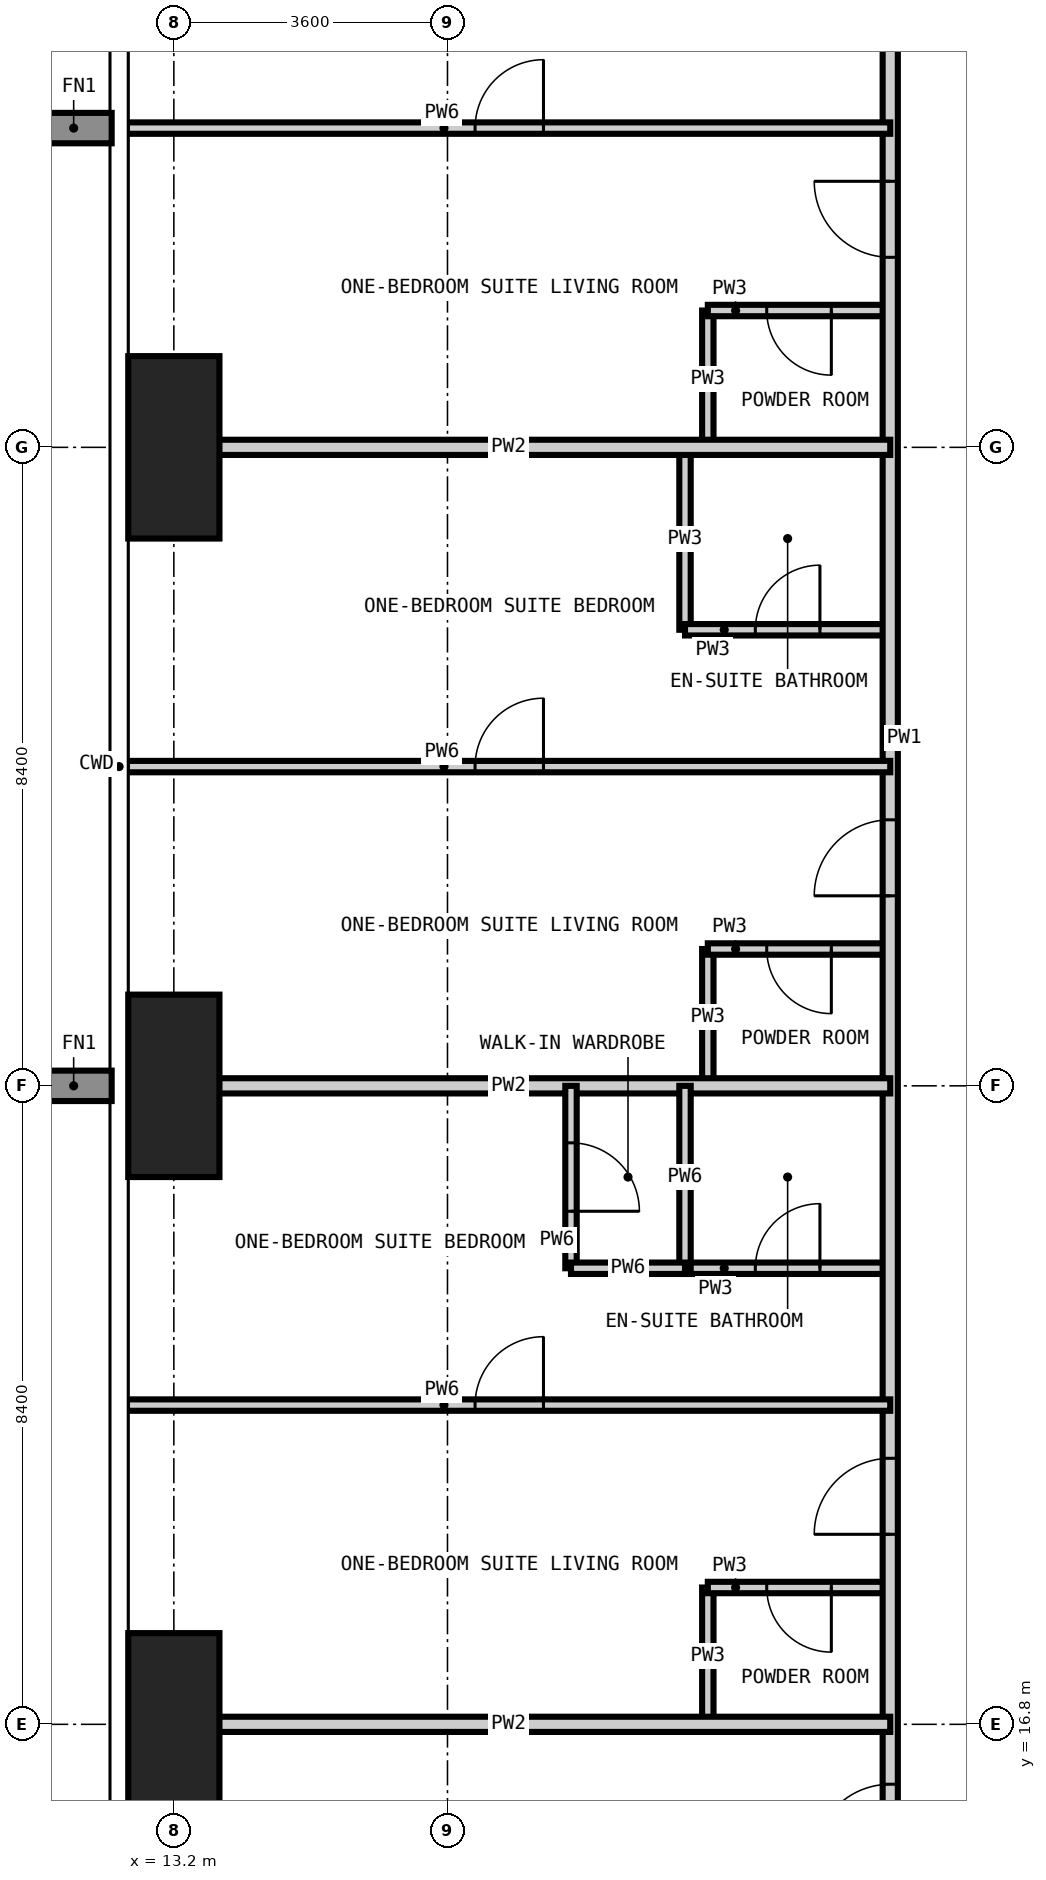
"""IFC4 building model, lengths in metres.
Left out: names, types, materials, properties, quantities, classifications, styles, units other than length and angle.
Written with IfcOpenShell. Run it as: python <this file> out.ifc"""

import sys

from ifc_helpers import new_model, si_unit, direction, frame, frame_2d, origin, origin_2d, place, context, subcontext, project, spatial, rectangle, extrude, element, fill, save


model = new_model("IFC4")
c1 = context("Model", 3, precision=1e-05, world=origin(), true_north=direction((0.0, 1.0)))
c2 = subcontext(c1, "Body", "Model", "MODEL_VIEW")
j1 = project(units=[si_unit("LENGTHUNIT", "METRE"), si_unit("PLANEANGLEUNIT", "RADIAN")], contexts=[c1])
p1 = place(None, origin())
s1 = spatial("IfcSite", under=j1, at=p1, CompositionType="ELEMENT")
p2 = place(p1, origin())
s2 = spatial("IfcBuilding", under=s1, at=p2, CompositionType="ELEMENT")
p3 = place(p2, frame((0.0, 0.0, 233.4)))
s3 = spatial("IfcBuildingStorey", under=s2, at=p3, CompositionType="ELEMENT", Elevation=233.4)
for number, where, z_axis, x_axis in (
    (1, (13.2, 16.8, -0.35), (0.0, 0.0, 1.0), (1.0, 0.0, 0.0)),
    (2, (13.2, 25.2, -0.35), (0.0, 0.0, 1.0), (1.0, 0.0, 0.0)),
    (3, (13.2, 33.6, -0.35), (0.0, 0.0, 1.0), (1.0, 0.0, 0.0)),
):
    element("IfcColumn", number, at=place(p3, frame(where, z_axis=z_axis, x_axis=x_axis)), inside=s3, PredefinedType="COLUMN", context=c2, shape_type="SweptSolid", body=[
        extrude(rectangle(XDim=1.2, YDim=2.4, at=origin_2d()), origin(), (0.0, 0.0, 1.0), 3.9),
    ])
p4 = place(p3, frame((19.925, 31.2, 0.0), z_axis=(0.0, 0.0, 1.0), x_axis=(0.0, 1.0, 0.0)))
e4 = element("IfcWall", 4, at=p4, inside=s3, PredefinedType="PARTITIONING", context=c2, shape_type="SweptSolid", body=[
    extrude(rectangle(XDim=2.4, YDim=0.15, at=frame_2d((1.2, 0.0))), origin(), (0.0, 0.0, 1.0), 3.55),
])
for number, where, z_axis, x_axis in (
    (5, (20.225, 16.8, 0.0), (0.0, 0.0, 1.0), (0.0, 1.0, 0.0)),
    (6, (20.225, 25.2, 0.0), (0.0, 0.0, 1.0), (0.0, 1.0, 0.0)),
):
    element("IfcWall", number, at=place(p3, frame(where, z_axis=z_axis, x_axis=x_axis)), inside=s3, PredefinedType="PARTITIONING", context=c2, shape_type="SweptSolid", body=[
        extrude(rectangle(XDim=1.8, YDim=0.15, at=frame_2d((0.9, 0.0))), origin(), (0.0, 0.0, 1.0), 3.55),
    ])
p5 = place(p3, frame((20.225, 33.6, 0.0), z_axis=(0.0, 0.0, 1.0), x_axis=(0.0, 1.0, 0.0)))
e7 = element("IfcWall", 7, at=p5, inside=s3, PredefinedType="PARTITIONING", context=c2, shape_type="SweptSolid", body=[
    extrude(rectangle(XDim=1.8, YDim=0.15, at=frame_2d((0.9, 0.0))), origin(), (0.0, 0.0, 1.0), 3.55),
])
p6 = place(p3, frame((20.225, 18.6, 0.0), z_axis=(0.0, 0.0, 1.0), x_axis=(1.0, 0.0, 0.0)))
e8 = element("IfcWall", 8, at=p6, inside=s3, PredefinedType="PARTITIONING", context=c2, shape_type="SweptSolid", body=[
    extrude(rectangle(XDim=2.4, YDim=0.15, at=frame_2d((1.2, 0.0))), origin(), (0.0, 0.0, 1.0), 3.55),
])
p7 = place(p6, frame((0.775, 0.0, 0.0)))
e9 = element("IfcOpeningElement", 9, at=p7, cuts=e8, PredefinedType="OPENING", context=c2, shape_type="SweptSolid", body=[
    extrude(rectangle(XDim=0.85, YDim=2.1, at=frame_2d((0.425, 1.05))), frame((0.0, 0.085, 0.0), z_axis=(0.0, -1.0, 0.0), x_axis=(1.0, 0.0, 0.0)), (0.0, 0.0, 1.0), 0.17),
])
p8 = place(p3, frame((19.925, 22.8, 0.0), z_axis=(0.0, 0.0, 1.0), x_axis=(1.0, 0.0, 0.0)))
e10 = element("IfcWall", 10, at=p8, inside=s3, PredefinedType="PARTITIONING", context=c2, shape_type="SweptSolid", body=[
    extrude(rectangle(XDim=2.7, YDim=0.15, at=frame_2d((1.35, 0.0))), origin(), (0.0, 0.0, 1.0), 3.55),
])
p9 = place(p8, frame((0.925, 0.0, 0.0)))
e11 = element("IfcOpeningElement", 11, at=p9, cuts=e10, PredefinedType="OPENING", context=c2, shape_type="SweptSolid", body=[
    extrude(rectangle(XDim=0.85, YDim=2.1, at=frame_2d((0.425, 1.05))), frame((0.0, 0.085, 0.0), z_axis=(0.0, -1.0, 0.0), x_axis=(1.0, 0.0, 0.0)), (0.0, 0.0, 1.0), 0.17),
])
p10 = place(p3, frame((20.225, 27.0, 0.0), z_axis=(0.0, 0.0, 1.0), x_axis=(1.0, 0.0, 0.0)))
e12 = element("IfcWall", 12, at=p10, inside=s3, PredefinedType="PARTITIONING", context=c2, shape_type="SweptSolid", body=[
    extrude(rectangle(XDim=2.4, YDim=0.15, at=frame_2d((1.2, 0.0))), origin(), (0.0, 0.0, 1.0), 3.55),
])
p11 = place(p10, frame((0.775, 0.0, 0.0)))
e13 = element("IfcOpeningElement", 13, at=p11, cuts=e12, PredefinedType="OPENING", context=c2, shape_type="SweptSolid", body=[
    extrude(rectangle(XDim=0.85, YDim=2.1, at=frame_2d((0.425, 1.05))), frame((0.0, 0.085, 0.0), z_axis=(0.0, -1.0, 0.0), x_axis=(1.0, 0.0, 0.0)), (0.0, 0.0, 1.0), 0.17),
])
p12 = place(p3, frame((19.925, 31.2, 0.0), z_axis=(0.0, 0.0, 1.0), x_axis=(1.0, 0.0, 0.0)))
e14 = element("IfcWall", 14, at=p12, inside=s3, PredefinedType="PARTITIONING", context=c2, shape_type="SweptSolid", body=[
    extrude(rectangle(XDim=2.7, YDim=0.15, at=frame_2d((1.35, 0.0))), origin(), (0.0, 0.0, 1.0), 3.55),
])
p13 = place(p12, frame((0.925, 0.0, 0.0)))
e15 = element("IfcOpeningElement", 15, at=p13, cuts=e14, PredefinedType="OPENING", context=c2, shape_type="SweptSolid", body=[
    extrude(rectangle(XDim=0.85, YDim=2.1, at=frame_2d((0.425, 1.05))), frame((0.0, 0.085, 0.0), z_axis=(0.0, -1.0, 0.0), x_axis=(1.0, 0.0, 0.0)), (0.0, 0.0, 1.0), 0.17),
])
p14 = place(p3, frame((20.225, 35.4, 0.0), z_axis=(0.0, 0.0, 1.0), x_axis=(1.0, 0.0, 0.0)))
e16 = element("IfcWall", 16, at=p14, inside=s3, PredefinedType="PARTITIONING", context=c2, shape_type="SweptSolid", body=[
    extrude(rectangle(XDim=2.4, YDim=0.15, at=frame_2d((1.2, 0.0))), origin(), (0.0, 0.0, 1.0), 3.55),
])
p15 = place(p14, frame((0.775, 0.0, 0.0)))
e17 = element("IfcOpeningElement", 17, at=p15, cuts=e16, PredefinedType="OPENING", context=c2, shape_type="SweptSolid", body=[
    extrude(rectangle(XDim=0.85, YDim=2.1, at=frame_2d((0.425, 1.05))), frame((0.0, 0.085, 0.0), z_axis=(0.0, -1.0, 0.0), x_axis=(1.0, 0.0, 0.0)), (0.0, 0.0, 1.0), 0.17),
])
p16 = place(p3, frame((22.625, 14.225, 0.0), z_axis=(0.0, 0.0, 1.0), x_axis=(0.0, 1.0, 0.0)))
e18 = element("IfcWall", 18, at=p16, inside=s3, PredefinedType="PARTITIONING", context=c2, shape_type="SweptSolid", body=[
    extrude(rectangle(XDim=30.95, YDim=0.2, at=frame_2d((15.475, 0.0))), origin(), (0.0, 0.0, 1.0), 3.55),
])
p17 = place(p16, frame((5.075, 0.0, 0.0)))
e19 = element("IfcOpeningElement", 19, at=p17, cuts=e18, PredefinedType="OPENING", context=c2, shape_type="SweptSolid", body=[
    extrude(rectangle(XDim=1.0, YDim=2.2, at=frame_2d((0.5, 1.1))), frame((0.0, 0.11, 0.0), z_axis=(0.0, -1.0, 0.0), x_axis=(1.0, 0.0, 0.0)), (0.0, 0.0, 1.0), 0.22),
])
p18 = place(p16, frame((13.475, 0.0, 0.0)))
e20 = element("IfcOpeningElement", 20, at=p18, cuts=e18, PredefinedType="OPENING", context=c2, shape_type="SweptSolid", body=[
    extrude(rectangle(XDim=1.0, YDim=2.2, at=frame_2d((0.5, 1.1))), frame((0.0, 0.11, 0.0), z_axis=(0.0, -1.0, 0.0), x_axis=(1.0, 0.0, 0.0)), (0.0, 0.0, 1.0), 0.22),
])
p19 = place(p16, frame((21.875, 0.0, 0.0)))
e21 = element("IfcOpeningElement", 21, at=p19, cuts=e18, PredefinedType="OPENING", context=c2, shape_type="SweptSolid", body=[
    extrude(rectangle(XDim=1.0, YDim=2.2, at=frame_2d((0.5, 1.1))), frame((0.0, 0.11, 0.0), z_axis=(0.0, -1.0, 0.0), x_axis=(1.0, 0.0, 0.0)), (0.0, 0.0, 1.0), 0.22),
])
p20 = place(p16, frame((0.787, 0.0, 0.0)))
e22 = element("IfcOpeningElement", 22, at=p20, cuts=e18, PredefinedType="OPENING", context=c2, shape_type="SweptSolid", body=[
    extrude(rectangle(XDim=1.0, YDim=2.2, at=frame_2d((0.5, 1.1))), frame((0.0, 0.11, 0.0), z_axis=(0.0, -1.0, 0.0), x_axis=(1.0, 0.0, 0.0)), (0.0, 0.0, 1.0), 0.22),
])
p21 = place(p16, frame((28.862, 0.0, 0.0)))
e23 = element("IfcOpeningElement", 23, at=p21, cuts=e18, PredefinedType="OPENING", context=c2, shape_type="SweptSolid", body=[
    extrude(rectangle(XDim=1.0, YDim=2.2, at=frame_2d((0.5, 1.1))), frame((0.0, 0.11, 0.0), z_axis=(0.0, -1.0, 0.0), x_axis=(1.0, 0.0, 0.0)), (0.0, 0.0, 1.0), 0.22),
])
for number, where, z_axis, x_axis in (
    (24, (12.582, 16.8, 0.0), (0.0, 0.0, 1.0), (1.0, 0.0, 0.0)),
    (25, (12.582, 25.2, 0.0), (0.0, 0.0, 1.0), (1.0, 0.0, 0.0)),
    (26, (12.582, 33.6, 0.0), (0.0, 0.0, 1.0), (1.0, 0.0, 0.0)),
):
    element("IfcWall", number, at=place(p3, frame(where, z_axis=z_axis, x_axis=x_axis)), inside=s3, PredefinedType="PARTITIONING", context=c2, shape_type="SweptSolid", body=[
        extrude(rectangle(XDim=10.043, YDim=0.2, at=frame_2d((5.021, 0.0))), origin(), (0.0, 0.0, 1.0), 3.55),
    ])
p22 = place(p3, frame((18.425, 22.8, 0.0), z_axis=(0.0, 0.0, 1.0), x_axis=(0.0, 1.0, 0.0)))
e27 = element("IfcWall", 27, at=p22, inside=s3, PredefinedType="PARTITIONING", context=c2, shape_type="SweptSolid", body=[
    extrude(rectangle(XDim=2.4, YDim=0.15, at=frame_2d((1.2, 0.0))), origin(), (0.0, 0.0, 1.0), 3.55),
])
p23 = place(p22, frame((0.75, 0.0, 0.0)))
e28 = element("IfcOpeningElement", 28, at=p23, cuts=e27, PredefinedType="OPENING", context=c2, shape_type="SweptSolid", body=[
    extrude(rectangle(XDim=0.9, YDim=2.1, at=frame_2d((0.45, 1.05))), frame((0.0, 0.085, 0.0), z_axis=(0.0, -1.0, 0.0), x_axis=(1.0, 0.0, 0.0)), (0.0, 0.0, 1.0), 0.17),
])
p24 = place(p3, frame((19.925, 22.8, 0.0), z_axis=(0.0, 0.0, 1.0), x_axis=(0.0, 1.0, 0.0)))
e29 = element("IfcWall", 29, at=p24, inside=s3, PredefinedType="PARTITIONING", context=c2, shape_type="SweptSolid", body=[
    extrude(rectangle(XDim=2.4, YDim=0.15, at=frame_2d((1.2, 0.0))), origin(), (0.0, 0.0, 1.0), 3.55),
])
p25 = place(p3, frame((12.582, 21.0, 0.0), z_axis=(0.0, 0.0, 1.0), x_axis=(1.0, 0.0, 0.0)))
e30 = element("IfcWall", 30, at=p25, inside=s3, PredefinedType="PARTITIONING", context=c2, shape_type="SweptSolid", body=[
    extrude(rectangle(XDim=10.043, YDim=0.15, at=frame_2d((5.021, 0.0))), origin(), (0.0, 0.0, 1.0), 3.55),
])
p26 = place(p25, frame((4.581, 0.0, 0.0)))
e31 = element("IfcOpeningElement", 31, at=p26, cuts=e30, PredefinedType="OPENING", context=c2, shape_type="SweptSolid", body=[
    extrude(rectangle(XDim=0.9, YDim=2.1, at=frame_2d((0.45, 1.05))), frame((0.0, 0.085, 0.0), z_axis=(0.0, -1.0, 0.0), x_axis=(1.0, 0.0, 0.0)), (0.0, 0.0, 1.0), 0.17),
])
p27 = place(p3, frame((18.425, 22.8, 0.0), z_axis=(0.0, 0.0, 1.0), x_axis=(1.0, 0.0, 0.0)))
e32 = element("IfcWall", 32, at=p27, inside=s3, PredefinedType="PARTITIONING", context=c2, shape_type="SweptSolid", body=[
    extrude(rectangle(XDim=1.5, YDim=0.15, at=frame_2d((0.75, 0.0))), origin(), (0.0, 0.0, 1.0), 3.55),
])
p28 = place(p3, frame((12.582, 29.4, 0.0), z_axis=(0.0, 0.0, 1.0), x_axis=(1.0, 0.0, 0.0)))
e33 = element("IfcWall", 33, at=p28, inside=s3, PredefinedType="PARTITIONING", context=c2, shape_type="SweptSolid", body=[
    extrude(rectangle(XDim=10.043, YDim=0.15, at=frame_2d((5.021, 0.0))), origin(), (0.0, 0.0, 1.0), 3.55),
])
p29 = place(p28, frame((4.581, 0.0, 0.0)))
e34 = element("IfcOpeningElement", 34, at=p29, cuts=e33, PredefinedType="OPENING", context=c2, shape_type="SweptSolid", body=[
    extrude(rectangle(XDim=0.9, YDim=2.1, at=frame_2d((0.45, 1.05))), frame((0.0, 0.085, 0.0), z_axis=(0.0, -1.0, 0.0), x_axis=(1.0, 0.0, 0.0)), (0.0, 0.0, 1.0), 0.17),
])
p30 = place(p3, frame((12.582, 37.8, 0.0), z_axis=(0.0, 0.0, 1.0), x_axis=(1.0, 0.0, 0.0)))
e35 = element("IfcWall", 35, at=p30, inside=s3, PredefinedType="PARTITIONING", context=c2, shape_type="SweptSolid", body=[
    extrude(rectangle(XDim=10.043, YDim=0.15, at=frame_2d((5.021, 0.0))), origin(), (0.0, 0.0, 1.0), 3.55),
])
p31 = place(p30, frame((4.581, 0.0, 0.0)))
e36 = element("IfcOpeningElement", 36, at=p31, cuts=e35, PredefinedType="OPENING", context=c2, shape_type="SweptSolid", body=[
    extrude(rectangle(XDim=0.9, YDim=2.1, at=frame_2d((0.45, 1.05))), frame((0.0, 0.085, 0.0), z_axis=(0.0, -1.0, 0.0), x_axis=(1.0, 0.0, 0.0)), (0.0, 0.0, 1.0), 0.17),
])
p32 = place(p17, origin())
e37 = element("IfcDoor", 37, at=p32, inside=s3, OperationType="SINGLE_SWING_LEFT", PredefinedType="DOOR", context=c2, shape_type="SweptSolid", body=[
    extrude(rectangle(XDim=1.0, YDim=2.2, at=frame_2d((0.5, 1.1))), frame((0.0, 0.025, 0.0), z_axis=(0.0, -1.0, 0.0), x_axis=(1.0, 0.0, 0.0)), (0.0, 0.0, 1.0), 0.05),
])
fill(e19, e37)
p33 = place(p7, frame((0.85, 0.0, 0.0), z_axis=(0.0, 0.0, 1.0), x_axis=(-1.0, 0.0, 0.0)))
e38 = element("IfcDoor", 38, at=p33, inside=s3, OperationType="SINGLE_SWING_LEFT", PredefinedType="DOOR", context=c2, shape_type="SweptSolid", body=[
    extrude(rectangle(XDim=0.85, YDim=2.1, at=frame_2d((0.425, 1.05))), frame((0.0, 0.025, 0.0), z_axis=(0.0, -1.0, 0.0), x_axis=(1.0, 0.0, 0.0)), (0.0, 0.0, 1.0), 0.05),
])
fill(e9, e38)
p34 = place(p26, origin())
e39 = element("IfcDoor", 39, at=p34, inside=s3, OperationType="SINGLE_SWING_RIGHT", PredefinedType="DOOR", context=c2, shape_type="SweptSolid", body=[
    extrude(rectangle(XDim=0.9, YDim=2.1, at=frame_2d((0.45, 1.05))), frame((0.0, 0.025, 0.0), z_axis=(0.0, -1.0, 0.0), x_axis=(1.0, 0.0, 0.0)), (0.0, 0.0, 1.0), 0.05),
])
fill(e31, e39)
p35 = place(p9, origin())
e40 = element("IfcDoor", 40, at=p35, inside=s3, OperationType="SINGLE_SWING_RIGHT", PredefinedType="DOOR", context=c2, shape_type="SweptSolid", body=[
    extrude(rectangle(XDim=0.85, YDim=2.1, at=frame_2d((0.425, 1.05))), frame((0.0, 0.025, 0.0), z_axis=(0.0, -1.0, 0.0), x_axis=(1.0, 0.0, 0.0)), (0.0, 0.0, 1.0), 0.05),
])
fill(e11, e40)
p36 = place(p23, frame((0.9, 0.0, 0.0), z_axis=(0.0, 0.0, 1.0), x_axis=(-1.0, 0.0, 0.0)))
e41 = element("IfcDoor", 41, at=p36, inside=s3, OperationType="SINGLE_SWING_RIGHT", PredefinedType="DOOR", context=c2, shape_type="SweptSolid", body=[
    extrude(rectangle(XDim=0.9, YDim=2.1, at=frame_2d((0.45, 1.05))), frame((0.0, 0.025, 0.0), z_axis=(0.0, -1.0, 0.0), x_axis=(1.0, 0.0, 0.0)), (0.0, 0.0, 1.0), 0.05),
])
fill(e28, e41)
p37 = place(p18, origin())
e42 = element("IfcDoor", 42, at=p37, inside=s3, OperationType="SINGLE_SWING_LEFT", PredefinedType="DOOR", context=c2, shape_type="SweptSolid", body=[
    extrude(rectangle(XDim=1.0, YDim=2.2, at=frame_2d((0.5, 1.1))), frame((0.0, 0.025, 0.0), z_axis=(0.0, -1.0, 0.0), x_axis=(1.0, 0.0, 0.0)), (0.0, 0.0, 1.0), 0.05),
])
fill(e20, e42)
p38 = place(p11, frame((0.85, 0.0, 0.0), z_axis=(0.0, 0.0, 1.0), x_axis=(-1.0, 0.0, 0.0)))
e43 = element("IfcDoor", 43, at=p38, inside=s3, OperationType="SINGLE_SWING_LEFT", PredefinedType="DOOR", context=c2, shape_type="SweptSolid", body=[
    extrude(rectangle(XDim=0.85, YDim=2.1, at=frame_2d((0.425, 1.05))), frame((0.0, 0.025, 0.0), z_axis=(0.0, -1.0, 0.0), x_axis=(1.0, 0.0, 0.0)), (0.0, 0.0, 1.0), 0.05),
])
fill(e13, e43)
p39 = place(p29, origin())
e44 = element("IfcDoor", 44, at=p39, inside=s3, OperationType="SINGLE_SWING_RIGHT", PredefinedType="DOOR", context=c2, shape_type="SweptSolid", body=[
    extrude(rectangle(XDim=0.9, YDim=2.1, at=frame_2d((0.45, 1.05))), frame((0.0, 0.025, 0.0), z_axis=(0.0, -1.0, 0.0), x_axis=(1.0, 0.0, 0.0)), (0.0, 0.0, 1.0), 0.05),
])
fill(e34, e44)
p40 = place(p13, origin())
e45 = element("IfcDoor", 45, at=p40, inside=s3, OperationType="SINGLE_SWING_RIGHT", PredefinedType="DOOR", context=c2, shape_type="SweptSolid", body=[
    extrude(rectangle(XDim=0.85, YDim=2.1, at=frame_2d((0.425, 1.05))), frame((0.0, 0.025, 0.0), z_axis=(0.0, -1.0, 0.0), x_axis=(1.0, 0.0, 0.0)), (0.0, 0.0, 1.0), 0.05),
])
fill(e15, e45)
p41 = place(p19, origin())
e46 = element("IfcDoor", 46, at=p41, inside=s3, OperationType="SINGLE_SWING_RIGHT", PredefinedType="DOOR", context=c2, shape_type="SweptSolid", body=[
    extrude(rectangle(XDim=1.0, YDim=2.2, at=frame_2d((0.5, 1.1))), frame((0.0, 0.025, 0.0), z_axis=(0.0, -1.0, 0.0), x_axis=(1.0, 0.0, 0.0)), (0.0, 0.0, 1.0), 0.05),
])
fill(e21, e46)
p42 = place(p15, frame((0.85, 0.0, 0.0), z_axis=(0.0, 0.0, 1.0), x_axis=(-1.0, 0.0, 0.0)))
e47 = element("IfcDoor", 47, at=p42, inside=s3, OperationType="SINGLE_SWING_LEFT", PredefinedType="DOOR", context=c2, shape_type="SweptSolid", body=[
    extrude(rectangle(XDim=0.85, YDim=2.1, at=frame_2d((0.425, 1.05))), frame((0.0, 0.025, 0.0), z_axis=(0.0, -1.0, 0.0), x_axis=(1.0, 0.0, 0.0)), (0.0, 0.0, 1.0), 0.05),
])
fill(e17, e47)
p43 = place(p31, origin())
e48 = element("IfcDoor", 48, at=p43, inside=s3, OperationType="SINGLE_SWING_RIGHT", PredefinedType="DOOR", context=c2, shape_type="SweptSolid", body=[
    extrude(rectangle(XDim=0.9, YDim=2.1, at=frame_2d((0.45, 1.05))), frame((0.0, 0.025, 0.0), z_axis=(0.0, -1.0, 0.0), x_axis=(1.0, 0.0, 0.0)), (0.0, 0.0, 1.0), 0.05),
])
fill(e36, e48)
p44 = place(p20, origin())
e49 = element("IfcDoor", 49, at=p44, inside=s3, OperationType="SINGLE_SWING_LEFT", PredefinedType="DOOR", context=c2, shape_type="SweptSolid", body=[
    extrude(rectangle(XDim=1.0, YDim=2.2, at=frame_2d((0.5, 1.1))), frame((0.0, 0.025, 0.0), z_axis=(0.0, -1.0, 0.0), x_axis=(1.0, 0.0, 0.0)), (0.0, 0.0, 1.0), 0.05),
])
fill(e22, e49)
save(model, sys.argv[1])
